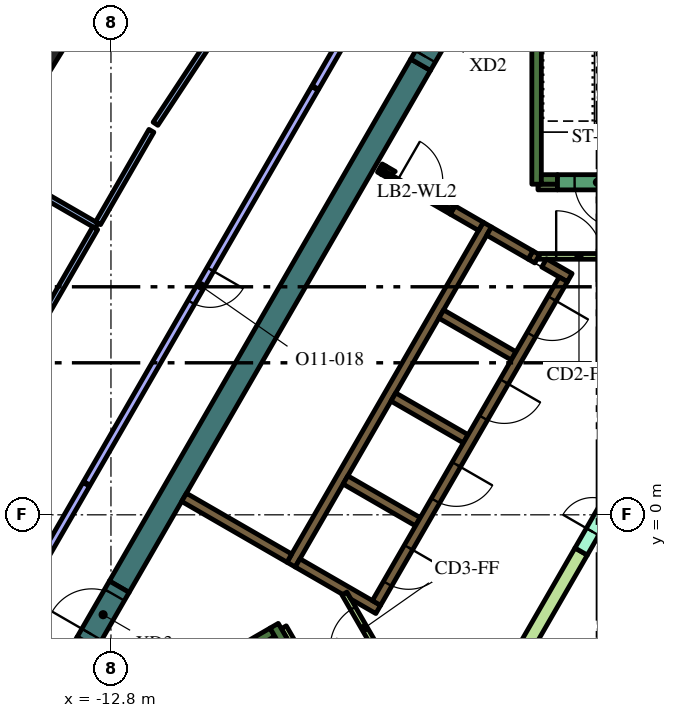
"""IFC4 building model, lengths in metres.
Left out: names, types, materials, properties, quantities, classifications, styles, units other than length and angle.
Written with IfcOpenShell. Run it as: python <this file> out.ifc"""

import sys

from ifc_helpers import new_model, si_unit, direction, frame, frame_2d, origin, origin_2d, place, context, subcontext, project, spatial, polyline, rectangle, outline, extrude, element, fill, save


model = new_model("IFC4")
c1 = context("Model", 3, precision=1e-05, world=origin(), true_north=direction((0.0, 1.0)))
c2 = subcontext(c1, "Body", "Model", "MODEL_VIEW")
j1 = project(units=[si_unit("LENGTHUNIT", "METRE"), si_unit("PLANEANGLEUNIT", "RADIAN")], contexts=[c1])
p1 = place(None, origin())
s1 = spatial("IfcSite", under=j1, at=p1, CompositionType="ELEMENT")
p2 = place(p1, origin())
s2 = spatial("IfcBuilding", under=s1, at=p2, CompositionType="ELEMENT")
p3 = place(p2, frame((0.0, 0.0, 267.0)))
s3 = spatial("IfcBuildingStorey", under=s2, at=p3, CompositionType="ELEMENT", Elevation=267.0)
p4 = place(p3, frame((-14.556, 12.098, 0.0), z_axis=(0.0, 0.0, 1.0), x_axis=(-0.525609744083, -0.850725805959, 0.0)))
e1 = element("IfcColumn", 1, at=p4, inside=s3, PredefinedType="COLUMN", context=c2, shape_type="SweptSolid", body=[
    extrude(rectangle(XDim=1.0, YDim=0.7, at=origin_2d()), origin(), (0.0, 0.0, 1.0), 4.2),
])
p5 = place(p3, frame((-13.432, -3.364, 0.0), z_axis=(0.0, 0.0, 1.0), x_axis=(-0.499960127962, -0.866048422692, 0.0)))
e2 = element("IfcWall", 2, at=p5, inside=s3, PredefinedType="SOLIDWALL", context=c2, shape_type="SweptSolid", body=[
    extrude(rectangle(XDim=2.934, YDim=0.6, at=frame_2d((1.467, 0.0))), origin(), (0.0, 0.0, 1.0), 4.2),
])
p6 = place(p3, frame((-4.652, 11.842, 0.0), z_axis=(0.0, 0.0, 1.0), x_axis=(-0.500003640647, -0.866023301845, 0.0)))
e3 = element("IfcWall", 3, at=p6, inside=s3, PredefinedType="SOLIDWALL", context=c2, shape_type="SweptSolid", body=[
    extrude(rectangle(XDim=15.858, YDim=0.6, at=frame_2d((7.929, 0.0))), origin(), (0.0, 0.0, 1.0), 4.2),
])
p7 = place(p3, frame((-1.6, 8.7, 0.0), z_axis=(0.0, 0.0, 1.0), x_axis=(0.0, 1.0, 0.0)))
e4 = element("IfcWall", 4, at=p7, inside=s3, PredefinedType="SOLIDWALL", context=c2, shape_type="SweptSolid", body=[
    extrude(rectangle(XDim=7.05, YDim=0.25, at=frame_2d((3.525, 0.0))), origin(), (0.0, 0.0, 1.0), 4.2),
])
p8 = place(p3, frame((-1.475, 8.825, 0.0), z_axis=(0.0, 0.0, 1.0), x_axis=(1.0, 0.0, 0.0)))
e5 = element("IfcWall", 5, at=p8, inside=s3, PredefinedType="SOLIDWALL", context=c2, shape_type="SweptSolid", body=[
    extrude(rectangle(XDim=0.425, YDim=0.25, at=frame_2d((0.212, 0.0))), origin(), (0.0, 0.0, 1.0), 4.2),
])
p9 = place(p3, frame((-14.44, -6.49, 0.0), z_axis=(0.0, 0.0, 1.0), x_axis=(0.866022966069, 0.500004222222, 0.0)))
e6 = element("IfcWall", 6, at=p9, inside=s3, PredefinedType="SOLIDWALL", context=c2, shape_type="SweptSolid", body=[
    extrude(rectangle(XDim=6.8, YDim=0.25, at=frame_2d((3.4, 0.0))), origin(), (0.0, 0.0, 1.0), 4.2),
])
p10 = place(p3, frame((-8.168, -3.503, 0.0), z_axis=(0.0, 0.0, 1.0), x_axis=(-0.499952099219, 0.866053057547, 0.0)))
e7 = element("IfcWall", 7, at=p10, inside=s3, PredefinedType="SOLIDWALL", context=c2, shape_type="SweptSolid", body=[
    extrude(rectangle(XDim=0.675, YDim=0.25, at=frame_2d((0.337, 0.0))), origin(), (0.0, 0.0, 1.0), 4.2),
])
p11 = place(p3, frame((-8.06, -1.311, 0.0), z_axis=(0.0, 0.0, 1.0), x_axis=(0.50000273126, 0.866023826885, 0.0)))
e8 = element("IfcWall", 8, at=p11, inside=s3, PredefinedType="SOLIDWALL", context=c2, shape_type="SweptSolid", body=[
    extrude(rectangle(XDim=10.33, YDim=0.25, at=frame_2d((5.165, 0.0))), origin(), (0.0, 0.0, 1.0), 4.2),
])
p12 = place(p3, frame((-1.758, 6.835, 0.0), z_axis=(0.0, 0.0, 1.0), x_axis=(0.865982457891, -0.500074377092, 0.0)))
e9 = element("IfcWall", 9, at=p12, inside=s3, PredefinedType="SOLIDWALL", context=c2, shape_type="SweptSolid", body=[
    extrude(rectangle(XDim=0.2, YDim=0.25, at=frame_2d((0.1, 0.0))), origin(), (0.0, 0.0, 1.0), 4.2),
])
p13 = place(p3, frame((-1.76, 6.836, 0.0), z_axis=(0.0, 0.0, 1.0), x_axis=(-0.865952863304, 0.500125622755, 0.0)))
e10 = element("IfcWall", 10, at=p13, inside=s3, PredefinedType="SOLIDWALL", context=c2, shape_type="SweptSolid", body=[
    extrude(rectangle(XDim=1.258, YDim=0.25, at=frame_2d((0.629, 0.0))), origin(), (0.0, 0.0, 1.0), 4.2),
])
p14 = place(p3, frame((-0.728, 6.24, 0.0), z_axis=(0.0, 0.0, 1.0), x_axis=(-0.865955664968, 0.500120771724, 0.0)))
e11 = element("IfcWall", 11, at=p14, inside=s3, PredefinedType="SOLIDWALL", context=c2, shape_type="SweptSolid", body=[
    extrude(rectangle(XDim=0.778, YDim=0.25, at=frame_2d((0.389, 0.0))), origin(), (0.0, 0.0, 1.0), 4.2),
])
for number, where, z_axis, x_axis in (
    (12, (-2.204, 4.182, 0.0), (0.0, 0.0, 1.0), (-0.866, 0.5, 0.0)),
    (13, (-5.369, 3.1, 0.0), (0.0, 0.0, 1.0), (0.866, -0.5, 0.0)),
    (14, (-4.724, -0.182, 0.0), (0.0, 0.0, 1.0), (-0.866, 0.5, 0.0)),
):
    element("IfcWall", number, at=place(p3, frame(where, z_axis=z_axis, x_axis=x_axis)), inside=s3, PredefinedType="SOLIDWALL", context=c2, shape_type="SweptSolid", body=[
        extrude(rectangle(XDim=2.2, YDim=0.25, at=frame_2d((1.1, 0.0))), origin(), (0.0, 0.0, 1.0), 4.2),
    ])
p15 = place(p3, origin())
e15 = element("IfcWall", 15, at=p15, inside=s3, PredefinedType="SOLIDWALL", context=c2, shape_type="SweptSolid", body=[
    extrude(outline(polyline([(-5.922, -2.257), (-5.922, -2.257), (-5.705, -2.382), (-5.83, -2.598), (-6.483, -2.221), (-6.591, -2.033), (-6.591, -2.033), (-6.7, -2.096), (-7.952, -1.373), (-7.827, -1.156), (-5.922, -2.257)])), origin(), (0.0, 0.0, 1.0), 4.2),
])
p16 = place(p3, frame((-8.106, -1.14, 0.0), z_axis=(0.0, 0.0, 1.0), x_axis=(-0.866008981251, 0.500028443584, 0.0)))
e16 = element("IfcWall", 16, at=p16, inside=s3, PredefinedType="SOLIDWALL", context=c2, shape_type="SweptSolid", body=[
    extrude(rectangle(XDim=3.2, YDim=0.25, at=frame_2d((1.6, 0.0))), origin(), (0.0, 0.0, 1.0), 4.2),
])
p17 = place(p3, frame((-5.725, 9.125, 0.0), z_axis=(0.0, 0.0, 1.0), x_axis=(0.866185586049, -0.49972245349, 0.0)))
e17 = element("IfcWall", 17, at=p17, inside=s3, PredefinedType="SOLIDWALL", context=c2, shape_type="SweptSolid", body=[
    extrude(rectangle(XDim=0.11, YDim=0.25, at=frame_2d((0.055, 0.0))), origin(), (0.0, 0.0, 1.0), 4.2),
])
p18 = place(p3, frame((-3.066, 7.59, 0.0), z_axis=(0.0, 0.0, 1.0), x_axis=(-0.866081358704, 0.49990307071, 0.0)))
e18 = element("IfcWall", 18, at=p18, inside=s3, PredefinedType="SOLIDWALL", context=c2, shape_type="SweptSolid", body=[
    extrude(rectangle(XDim=0.858, YDim=0.25, at=frame_2d((0.429, 0.0))), origin(), (0.0, 0.0, 1.0), 4.2),
])
e19 = element("IfcWall", 19, at=p15, inside=s3, PredefinedType="SOLIDWALL", context=c2, shape_type="SweptSolid", body=[
    extrude(outline(polyline([(-3.748, 8.128), (-3.813, 8.015), (-4.027, 8.139), (-4.017, 8.156), (-4.008, 8.173), (-4.0, 8.192), (-3.995, 8.21), (-3.991, 8.23), (-3.99, 8.25), (-3.99, 8.268), (-3.748, 8.128)])), origin(), (0.0, 0.0, 1.0), 4.2),
])
e20 = element("IfcWall", 20, at=p15, inside=s3, PredefinedType="SOLIDWALL", context=c2, shape_type="SweptSolid", body=[
    extrude(outline(polyline([(-5.689, 8.96), (-5.69, 8.961), (-5.565, 9.177), (-5.319, 9.035), (-5.335, 9.026), (-5.351, 9.015), (-5.366, 9.002), (-5.379, 8.988), (-5.392, 8.972), (-5.402, 8.956), (-5.412, 8.939), (-5.629, 9.064), (-5.629, 9.064), (-5.689, 8.96)])), origin(), (0.0, 0.0, 1.0), 4.2),
])
for number, where, z_axis, x_axis in (
    (21, (-8.252, -2.958, 0.0), (0.0, 0.0, 1.0), (0.5, -0.866, 0.0)),
    (22, (-1.564, 8.625, 0.0), (0.0, 0.0, 1.0), (1.0, 0.0, 0.0)),
):
    element("IfcWall", number, at=place(p3, frame(where, z_axis=z_axis, x_axis=x_axis)), inside=s3, PredefinedType="PARTITIONING", context=c2, shape_type="SweptSolid", body=[
        extrude(rectangle(XDim=0.514, YDim=0.15, at=frame_2d((0.257, 0.0))), origin(), (0.0, 0.0, 1.0), 3.55),
    ])
e23 = element("IfcWall", 23, at=p15, inside=s3, PredefinedType="PARTITIONING", context=c2, shape_type="SweptSolid", body=[
    extrude(outline(polyline([(-0.59, -0.872), (-0.265, -1.059), (-1.822, -3.756), (-2.147, -3.568), (-0.59, -0.872)])), origin(), (0.0, 0.0, 1.0), 3.55),
])
p19 = place(p3, frame((-0.898, 6.194, 0.0), z_axis=(0.0, 0.0, 1.0), x_axis=(-0.499996202215, -0.866027596426, 0.0)))
e24 = element("IfcWall", 24, at=p19, inside=s3, PredefinedType="SOLIDWALL", context=c2, shape_type="SweptSolid", body=[
    extrude(rectangle(XDim=9.83, YDim=0.25, at=frame_2d((4.915, 0.0))), origin(), (0.0, 0.0, 1.0), 4.2),
])
p20 = place(p19, frame((0.585, 0.0, 0.0)))
e25 = element("IfcOpeningElement", 25, at=p20, cuts=e24, PredefinedType="OPENING", context=c2, shape_type="SweptSolid", body=[
    extrude(rectangle(XDim=1.1, YDim=2.1, at=frame_2d((0.55, 1.05))), frame((0.0, 0.135, 0.0), z_axis=(0.0, -1.0, 0.0), x_axis=(1.0, 0.0, 0.0)), (0.0, 0.0, 1.0), 0.27),
])
p21 = place(p19, frame((3.105, 0.0, 0.0)))
e26 = element("IfcOpeningElement", 26, at=p21, cuts=e24, PredefinedType="OPENING", context=c2, shape_type="SweptSolid", body=[
    extrude(rectangle(XDim=1.1, YDim=2.1, at=frame_2d((0.55, 1.05))), frame((0.0, 0.135, 0.0), z_axis=(0.0, -1.0, 0.0), x_axis=(1.0, 0.0, 0.0)), (0.0, 0.0, 1.0), 0.27),
])
p22 = place(p19, frame((5.625, 0.0, 0.0)))
e27 = element("IfcOpeningElement", 27, at=p22, cuts=e24, PredefinedType="OPENING", context=c2, shape_type="SweptSolid", body=[
    extrude(rectangle(XDim=1.1, YDim=2.1, at=frame_2d((0.55, 1.05))), frame((0.0, 0.135, 0.0), z_axis=(0.0, -1.0, 0.0), x_axis=(1.0, 0.0, 0.0)), (0.0, 0.0, 1.0), 0.27),
])
p23 = place(p19, frame((8.145, 0.0, 0.0)))
e28 = element("IfcOpeningElement", 28, at=p23, cuts=e24, PredefinedType="OPENING", context=c2, shape_type="SweptSolid", body=[
    extrude(rectangle(XDim=1.1, YDim=2.1, at=frame_2d((0.55, 1.05))), frame((0.0, 0.135, 0.0), z_axis=(0.0, -1.0, 0.0), x_axis=(1.0, 0.0, 0.0)), (0.0, 0.0, 1.0), 0.27),
])
p24 = place(p3, frame((1.05, 8.75, 0.0), z_axis=(0.0, 0.0, 1.0), x_axis=(-1.0, 0.0, 0.0)))
e29 = element("IfcWall", 29, at=p24, inside=s3, PredefinedType="SOLIDWALL", context=c2, shape_type="SweptSolid", body=[
    extrude(rectangle(XDim=2.1, YDim=0.4, at=frame_2d((1.05, 0.0))), origin(), (0.0, 0.0, 1.0), 4.2),
])
p25 = place(p24, frame((0.45, 0.0, 0.0)))
e30 = element("IfcOpeningElement", 30, at=p25, cuts=e29, PredefinedType="OPENING", context=c2, shape_type="SweptSolid", body=[
    extrude(rectangle(XDim=1.2, YDim=2.1, at=frame_2d((0.6, 1.05))), frame((0.0, 0.21, 0.0), z_axis=(0.0, -1.0, 0.0), x_axis=(1.0, 0.0, 0.0)), (0.0, 0.0, 1.0), 0.42),
])
p26 = place(p3, frame((-0.427, -0.966, 0.0), z_axis=(0.0, 0.0, 1.0), x_axis=(0.49994051562, 0.866059744384, 0.0)))
e31 = element("IfcWall", 31, at=p26, inside=s3, PredefinedType="PARTITIONING", context=c2, shape_type="SweptSolid", body=[
    extrude(rectangle(XDim=2.1, YDim=0.375, at=frame_2d((1.05, 0.0))), origin(), (0.0, 0.0, 1.0), 3.55),
])
p27 = place(p26, frame((0.6, 0.0, 0.0)))
e32 = element("IfcOpeningElement", 32, at=p27, cuts=e31, PredefinedType="OPENING", context=c2, shape_type="SweptSolid", body=[
    extrude(rectangle(XDim=0.9, YDim=2.1, at=frame_2d((0.45, 1.05))), frame((0.0, 0.198, 0.0), z_axis=(0.0, -1.0, 0.0), x_axis=(1.0, 0.0, 0.0)), (0.0, 0.0, 1.0), 0.395),
])
p28 = place(p3, frame((-1.534, 6.8, 0.0), z_axis=(0.0, 0.0, 1.0), x_axis=(1.0, 0.0, 0.0)))
e33 = element("IfcWall", 33, at=p28, inside=s3, PredefinedType="PARTITIONING", context=c2, shape_type="SweptSolid", body=[
    extrude(rectangle(XDim=2.1, YDim=0.15, at=frame_2d((1.05, 0.0))), origin(), (0.0, 0.0, 1.0), 3.55),
])
p29 = place(p28, frame((0.45, 0.0, 0.0)))
e34 = element("IfcOpeningElement", 34, at=p29, cuts=e33, PredefinedType="OPENING", context=c2, shape_type="SweptSolid", body=[
    extrude(rectangle(XDim=1.2, YDim=2.1, at=frame_2d((0.6, 1.05))), frame((0.0, 0.085, 0.0), z_axis=(0.0, -1.0, 0.0), x_axis=(1.0, 0.0, 0.0)), (0.0, 0.0, 1.0), 0.17),
])
p30 = place(p3, frame((-5.606, -3.89, 0.0), z_axis=(0.0, 0.0, 1.0), x_axis=(-0.500027713859, 0.866009402589, 0.0)))
e35 = element("IfcWall", 35, at=p30, inside=s3, PredefinedType="PARTITIONING", context=c2, shape_type="SweptSolid", body=[
    extrude(rectangle(XDim=2.1, YDim=0.15, at=frame_2d((1.05, 0.0))), origin(), (0.0, 0.0, 1.0), 3.55),
])
p31 = place(p30, frame((0.45, 0.0, 0.0)))
e36 = element("IfcOpeningElement", 36, at=p31, cuts=e35, PredefinedType="OPENING", context=c2, shape_type="SweptSolid", body=[
    extrude(rectangle(XDim=1.2, YDim=2.1, at=frame_2d((0.6, 1.05))), frame((0.0, 0.085, 0.0), z_axis=(0.0, -1.0, 0.0), x_axis=(1.0, 0.0, 0.0)), (0.0, 0.0, 1.0), 0.17),
])
p32 = place(p3, frame((-5.659, 9.012, 0.0), z_axis=(0.0, 0.0, 1.0), x_axis=(0.866009402589, -0.500027713859, 0.0)))
e37 = element("IfcWall", 37, at=p32, inside=s3, PredefinedType="PARTITIONING", context=c2, shape_type="SweptSolid", body=[
    extrude(rectangle(XDim=2.1, YDim=0.12, at=frame_2d((1.05, 0.0))), origin(), (0.0, 0.0, 1.0), 3.55),
])
p33 = place(p32, frame((0.45, 0.0, 0.0)))
e38 = element("IfcOpeningElement", 38, at=p33, cuts=e37, PredefinedType="OPENING", context=c2, shape_type="SweptSolid", body=[
    extrude(rectangle(XDim=1.2, YDim=2.1, at=frame_2d((0.6, 1.05))), frame((0.0, 0.07, 0.0), z_axis=(0.0, -1.0, 0.0), x_axis=(1.0, 0.0, 0.0)), (0.0, 0.0, 1.0), 0.14),
])
p34 = place(p3, frame((-4.652, 11.842, 0.0), z_axis=(0.0, 0.0, 1.0), x_axis=(0.500062241894, 0.865989465428, 0.0)))
e39 = element("IfcWall", 39, at=p34, inside=s3, PredefinedType="SOLIDWALL", context=c2, shape_type="SweptSolid", body=[
    extrude(rectangle(XDim=1.7, YDim=0.6, at=frame_2d((0.85, 0.0))), origin(), (0.0, 0.0, 1.0), 4.2),
])
p35 = place(p34, frame((0.25, 0.0, 0.0)))
e40 = element("IfcOpeningElement", 40, at=p35, cuts=e39, PredefinedType="OPENING", context=c2, shape_type="SweptSolid", body=[
    extrude(rectangle(XDim=1.2, YDim=2.1, at=frame_2d((0.6, 1.05))), frame((0.0, 0.31, 0.0), z_axis=(0.0, -1.0, 0.0), x_axis=(1.0, 0.0, 0.0)), (0.0, 0.0, 1.0), 0.62),
])
p36 = place(p3, frame((-13.432, -3.364, 0.0), z_axis=(0.0, 0.0, 1.0), x_axis=(0.500000056704, 0.866025371046, 0.0)))
e41 = element("IfcWall", 41, at=p36, inside=s3, PredefinedType="SOLIDWALL", context=c2, shape_type="SweptSolid", body=[
    extrude(rectangle(XDim=1.7, YDim=0.6, at=frame_2d((0.85, 0.0))), origin(), (0.0, 0.0, 1.0), 4.2),
])
p37 = place(p36, frame((0.25, 0.0, 0.0)))
e42 = element("IfcOpeningElement", 42, at=p37, cuts=e41, PredefinedType="OPENING", context=c2, shape_type="SweptSolid", body=[
    extrude(rectangle(XDim=1.2, YDim=2.1, at=frame_2d((0.6, 1.05))), frame((0.0, 0.31, 0.0), z_axis=(0.0, -1.0, 0.0), x_axis=(1.0, 0.0, 0.0)), (0.0, 0.0, 1.0), 0.62),
])
p38 = place(p3, frame((-13.177, 7.608, 0.0), z_axis=(0.0, 0.0, 1.0), x_axis=(-0.866018442252, 0.500012057535, 0.0)))
e43 = element("IfcWall", 43, at=p38, inside=s3, PredefinedType="PARTITIONING", context=c2, shape_type="SweptSolid", body=[
    extrude(rectangle(XDim=3.6, YDim=0.15, at=frame_2d((1.8, 0.0))), origin(), (0.0, 0.0, 1.0), 3.55),
])
p39 = place(p3, frame((-11.628, 10.29, 0.0), z_axis=(0.0, 0.0, 1.0), x_axis=(0.55074607557, 0.834672846236, 0.0)))
e44 = element("IfcWall", 44, at=p39, inside=s3, PredefinedType="PARTITIONING", context=c2, shape_type="SweptSolid", body=[
    extrude(rectangle(XDim=5.979, YDim=0.15, at=frame_2d((2.99, 0.0))), origin(), (0.0, 0.0, 1.0), 3.55),
])
p40 = place(p39, frame((2.58, 0.0, 0.0)))
e45 = element("IfcOpeningElement", 45, at=p40, cuts=e44, PredefinedType="OPENING", context=c2, shape_type="SweptSolid", body=[
    extrude(rectangle(XDim=0.9, YDim=2.1, at=frame_2d((0.45, 1.05))), frame((0.0, 0.085, 0.0), z_axis=(0.0, -1.0, 0.0), x_axis=(1.0, 0.0, 0.0)), (0.0, 0.0, 1.0), 0.17),
])
p41 = place(p3, frame((-11.736, 10.104, 0.0), z_axis=(0.0, 0.0, 1.0), x_axis=(-0.500011000363, -0.866019052629, 0.0)))
e46 = element("IfcWall", 46, at=p41, inside=s3, PredefinedType="PARTITIONING", context=c2, shape_type="SweptSolid", body=[
    extrude(rectangle(XDim=2.808, YDim=0.15, at=frame_2d((1.404, 0.0))), origin(), (0.0, 0.0, 1.0), 3.55),
])
p42 = place(p3, frame((-13.214, 7.543, 0.0), z_axis=(0.0, 0.0, 1.0), x_axis=(-0.499927597274, -0.866067201483, 0.0)))
e47 = element("IfcWall", 47, at=p42, inside=s3, PredefinedType="PARTITIONING", context=c2, shape_type="SweptSolid", body=[
    extrude(rectangle(XDim=3.022, YDim=0.15, at=frame_2d((1.511, 0.0))), origin(), (0.0, 0.0, 1.0), 3.55),
])
p43 = place(p3, frame((-7.436, 11.221, 0.0), z_axis=(0.0, 0.0, 1.0), x_axis=(-0.49999894854, -0.866026010844, 0.0)))
e48 = element("IfcWall", 48, at=p43, inside=s3, PredefinedType="PARTITIONING", context=c2, shape_type="SweptSolid", body=[
    extrude(rectangle(XDim=12.0, YDim=0.2, at=frame_2d((6.0, 0.0))), origin(), (0.0, 0.0, 1.0), 3.55),
])
p44 = place(p43, frame((5.5, 0.0, 0.0)))
e49 = element("IfcOpeningElement", 49, at=p44, cuts=e48, PredefinedType="OPENING", context=c2, shape_type="SweptSolid", body=[
    extrude(rectangle(XDim=1.0, YDim=2.1, at=frame_2d((0.5, 1.05))), frame((0.0, 0.11, 0.0), z_axis=(0.0, -1.0, 0.0), x_axis=(1.0, 0.0, 0.0)), (0.0, 0.0, 1.0), 0.22),
])
p45 = place(p3, frame((-13.451, 0.803, 0.0), z_axis=(0.0, 0.0, 1.0), x_axis=(-0.499982585408, -0.86603545787, 0.0)))
e50 = element("IfcWall", 50, at=p45, inside=s3, PredefinedType="PARTITIONING", context=c2, shape_type="SweptSolid", body=[
    extrude(rectangle(XDim=8.26, YDim=0.2, at=frame_2d((4.13, 0.0))), origin(), (0.0, 0.0, 1.0), 3.55),
])
p46 = place(p3, frame((-3.306, 18.374, 0.0), z_axis=(0.0, 0.0, 1.0), x_axis=(-0.499999798456, -0.866025520146, 0.0)))
e51 = element("IfcWall", 51, at=p46, inside=s3, PredefinedType="PARTITIONING", context=c2, shape_type="SweptSolid", body=[
    extrude(rectangle(XDim=8.229, YDim=0.2, at=frame_2d((4.115, 0.0))), origin(), (0.0, 0.0, 1.0), 3.55),
])
p47 = place(p20, origin())
e52 = element("IfcDoor", 52, at=p47, inside=s3, OperationType="DOUBLE_DOOR_SLIDING", PredefinedType="DOOR", context=c2, shape_type="SweptSolid", body=[
    extrude(rectangle(XDim=1.1, YDim=2.1, at=frame_2d((0.55, 1.05))), frame((0.0, 0.025, 0.0), z_axis=(0.0, -1.0, 0.0), x_axis=(1.0, 0.0, 0.0)), (0.0, 0.0, 1.0), 0.05),
])
fill(e25, e52)
p48 = place(p21, origin())
e53 = element("IfcDoor", 53, at=p48, inside=s3, OperationType="DOUBLE_DOOR_SLIDING", PredefinedType="DOOR", context=c2, shape_type="SweptSolid", body=[
    extrude(rectangle(XDim=1.1, YDim=2.1, at=frame_2d((0.55, 1.05))), frame((0.0, 0.025, 0.0), z_axis=(0.0, -1.0, 0.0), x_axis=(1.0, 0.0, 0.0)), (0.0, 0.0, 1.0), 0.05),
])
fill(e26, e53)
p49 = place(p22, origin())
e54 = element("IfcDoor", 54, at=p49, inside=s3, OperationType="DOUBLE_DOOR_SLIDING", PredefinedType="DOOR", context=c2, shape_type="SweptSolid", body=[
    extrude(rectangle(XDim=1.1, YDim=2.1, at=frame_2d((0.55, 1.05))), frame((0.0, 0.025, 0.0), z_axis=(0.0, -1.0, 0.0), x_axis=(1.0, 0.0, 0.0)), (0.0, 0.0, 1.0), 0.05),
])
fill(e27, e54)
p50 = place(p23, origin())
e55 = element("IfcDoor", 55, at=p50, inside=s3, OperationType="DOUBLE_DOOR_SLIDING", PredefinedType="DOOR", context=c2, shape_type="SweptSolid", body=[
    extrude(rectangle(XDim=1.1, YDim=2.1, at=frame_2d((0.55, 1.05))), frame((0.0, 0.025, 0.0), z_axis=(0.0, -1.0, 0.0), x_axis=(1.0, 0.0, 0.0)), (0.0, 0.0, 1.0), 0.05),
])
fill(e28, e55)
p51 = place(p25, origin())
e56 = element("IfcDoor", 56, at=p51, inside=s3, OperationType="SINGLE_SWING_LEFT", PredefinedType="DOOR", context=c2, shape_type="SweptSolid", body=[
    extrude(rectangle(XDim=1.2, YDim=2.1, at=frame_2d((0.6, 1.05))), frame((0.0, 0.025, 0.0), z_axis=(0.0, -1.0, 0.0), x_axis=(1.0, 0.0, 0.0)), (0.0, 0.0, 1.0), 0.05),
])
fill(e30, e56)
p52 = place(p27, origin())
e57 = element("IfcDoor", 57, at=p52, inside=s3, OperationType="SINGLE_SWING_LEFT", PredefinedType="DOOR", context=c2, shape_type="SweptSolid", body=[
    extrude(rectangle(XDim=0.9, YDim=2.1, at=frame_2d((0.45, 1.05))), frame((0.0, 0.025, 0.0), z_axis=(0.0, -1.0, 0.0), x_axis=(1.0, 0.0, 0.0)), (0.0, 0.0, 1.0), 0.05),
])
fill(e32, e57)
p53 = place(p29, origin())
e58 = element("IfcDoor", 58, at=p53, inside=s3, OperationType="SINGLE_SWING_LEFT", PredefinedType="DOOR", context=c2, shape_type="SweptSolid", body=[
    extrude(rectangle(XDim=1.2, YDim=2.1, at=frame_2d((0.6, 1.05))), frame((0.0, 0.025, 0.0), z_axis=(0.0, -1.0, 0.0), x_axis=(1.0, 0.0, 0.0)), (0.0, 0.0, 1.0), 0.05),
])
fill(e34, e58)
p54 = place(p31, origin())
e59 = element("IfcDoor", 59, at=p54, inside=s3, OperationType="SINGLE_SWING_LEFT", PredefinedType="DOOR", context=c2, shape_type="SweptSolid", body=[
    extrude(rectangle(XDim=1.2, YDim=2.1, at=frame_2d((0.6, 1.05))), frame((0.0, 0.025, 0.0), z_axis=(0.0, -1.0, 0.0), x_axis=(1.0, 0.0, 0.0)), (0.0, 0.0, 1.0), 0.05),
])
fill(e36, e59)
p55 = place(p33, origin())
e60 = element("IfcDoor", 60, at=p55, inside=s3, OperationType="SINGLE_SWING_LEFT", PredefinedType="DOOR", context=c2, shape_type="SweptSolid", body=[
    extrude(rectangle(XDim=1.2, YDim=2.1, at=frame_2d((0.6, 1.05))), frame((0.0, 0.025, 0.0), z_axis=(0.0, -1.0, 0.0), x_axis=(1.0, 0.0, 0.0)), (0.0, 0.0, 1.0), 0.05),
])
fill(e38, e60)
p56 = place(p35, origin())
e61 = element("IfcDoor", 61, at=p56, inside=s3, OperationType="SINGLE_SWING_LEFT", PredefinedType="DOOR", context=c2, shape_type="SweptSolid", body=[
    extrude(rectangle(XDim=1.2, YDim=2.1, at=frame_2d((0.6, 1.05))), frame((0.0, 0.025, 0.0), z_axis=(0.0, -1.0, 0.0), x_axis=(1.0, 0.0, 0.0)), (0.0, 0.0, 1.0), 0.05),
])
fill(e40, e61)
p57 = place(p37, origin())
e62 = element("IfcDoor", 62, at=p57, inside=s3, OperationType="SINGLE_SWING_LEFT", PredefinedType="DOOR", context=c2, shape_type="SweptSolid", body=[
    extrude(rectangle(XDim=1.2, YDim=2.1, at=frame_2d((0.6, 1.05))), frame((0.0, 0.025, 0.0), z_axis=(0.0, -1.0, 0.0), x_axis=(1.0, 0.0, 0.0)), (0.0, 0.0, 1.0), 0.05),
])
fill(e42, e62)
p58 = place(p44, origin())
e63 = element("IfcDoor", 63, at=p58, inside=s3, OperationType="SINGLE_SWING_RIGHT", PredefinedType="DOOR", context=c2, shape_type="SweptSolid", body=[
    extrude(rectangle(XDim=1.0, YDim=2.1, at=frame_2d((0.5, 1.05))), frame((0.0, 0.025, 0.0), z_axis=(0.0, -1.0, 0.0), x_axis=(1.0, 0.0, 0.0)), (0.0, 0.0, 1.0), 0.05),
])
fill(e49, e63)
save(model, sys.argv[1])
